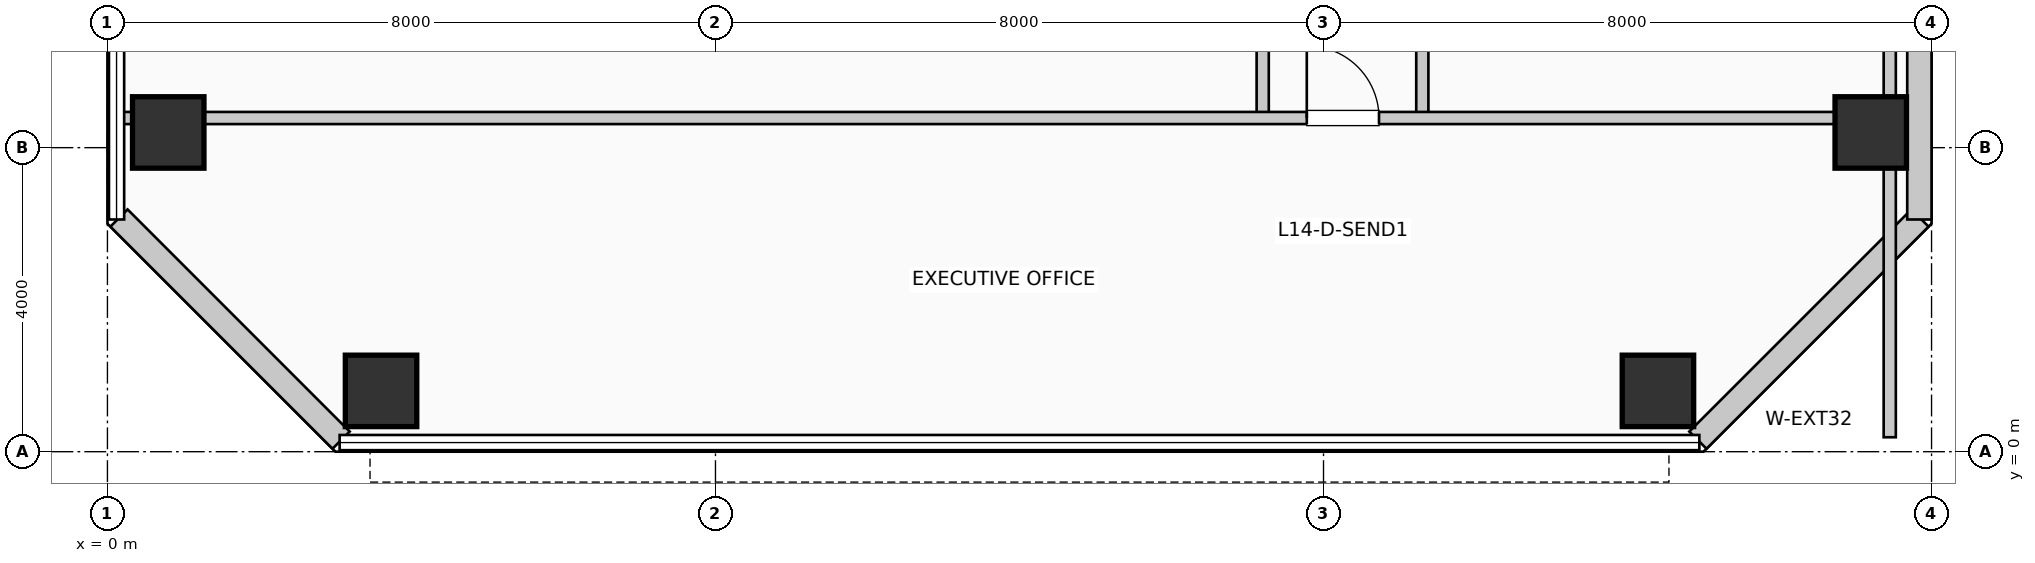
"""IFC4 building model, lengths in metres.
Left out: names, types, materials, properties, quantities, classifications, styles, units other than length and angle.
Written with IfcOpenShell. Run it as: python <this file> out.ifc"""

import sys

from ifc_helpers import new_model, si_unit, direction, frame, frame_2d, origin, origin_2d, place, context, subcontext, project, spatial, rectangle, extrude, element, fill, save


model = new_model("IFC4")
c1 = context("Model", 3, precision=1e-05, world=origin(), true_north=direction((0.0, 1.0)))
c2 = subcontext(c1, "Body", "Model", "MODEL_VIEW")
j1 = project(units=[si_unit("LENGTHUNIT", "METRE"), si_unit("PLANEANGLEUNIT", "RADIAN")], contexts=[c1])
p1 = place(None, origin())
s1 = spatial("IfcSite", under=j1, at=p1, CompositionType="ELEMENT")
p2 = place(p1, origin())
s2 = spatial("IfcBuilding", under=s1, at=p2, CompositionType="ELEMENT")
p3 = place(p2, frame((0.0, 0.0, 62.04)))
s3 = spatial("IfcBuildingStorey", under=s2, at=p3, CompositionType="ELEMENT", Elevation=62.04)
for number, where, z_axis, x_axis in (
    (1, (0.8, 4.2, 0.0), (0.0, 0.0, 1.0), (1.0, 0.0, 0.0)),
    (2, (3.6, 0.8, 0.0), (0.0, 0.0, 1.0), (1.0, 0.0, 0.0)),
    (3, (20.4, 0.8, 0.0), (0.0, 0.0, 1.0), (1.0, 0.0, 0.0)),
    (4, (23.2, 4.2, 0.0), (0.0, 0.0, 1.0), (1.0, 0.0, 0.0)),
):
    element("IfcColumn", number, at=place(p3, frame(where, z_axis=z_axis, x_axis=x_axis)), inside=s3, PredefinedType="COLUMN", context=c2, shape_type="SweptSolid", body=[
        extrude(rectangle(XDim=0.94, YDim=0.94, at=origin_2d()), origin(), (0.0, 0.0, 1.0), 3.96),
    ])
p4 = place(p3, frame((20.926, 0.152, 0.0), z_axis=(0.0, 0.0, 1.0), x_axis=(0.707106781187, 0.707106781187, 0.0)))
e5 = element("IfcWall", 5, at=p4, inside=s3, PredefinedType="SOLIDWALL", context=c2, shape_type="SweptSolid", body=[
    extrude(rectangle(XDim=4.133, YDim=0.32, at=frame_2d((2.066, 0.0))), origin(), (0.0, 0.0, 1.0), 3.71),
])
p5 = place(p3, frame((23.84, 3.055, 0.0), z_axis=(0.0, 0.0, 1.0), x_axis=(0.0, 1.0, 0.0)))
e6 = element("IfcWall", 6, at=p5, inside=s3, PredefinedType="SOLIDWALL", context=c2, shape_type="SweptSolid", body=[
    extrude(rectangle(XDim=12.89, YDim=0.32, at=frame_2d((6.445, 0.0))), origin(), (0.0, 0.0, 1.0), 3.71),
])
p6 = place(p3, frame((0.152, 3.074, 0.0), z_axis=(0.0, 0.0, 1.0), x_axis=(0.707106781187, -0.707106781187, 0.0)))
e7 = element("IfcWall", 7, at=p6, inside=s3, PredefinedType="SOLIDWALL", context=c2, shape_type="SweptSolid", body=[
    extrude(rectangle(XDim=4.133, YDim=0.32, at=frame_2d((2.066, 0.0))), origin(), (0.0, 0.0, 1.0), 3.71),
])
p7 = place(p3, frame((15.2, 4.39, 0.0), z_axis=(0.0, 0.0, 1.0), x_axis=(0.0, 1.0, 0.0)))
e8 = element("IfcWall", 8, at=p7, inside=s3, PredefinedType="PARTITIONING", context=c2, shape_type="SweptSolid", body=[
    extrude(rectangle(XDim=25.01, YDim=0.16, at=frame_2d((12.505, 0.0))), origin(), (0.0, 0.0, 1.0), 3.71),
])
p8 = place(p7, frame((2.851, 0.0, 0.0), z_axis=(0.0, 0.0, 1.0), x_axis=(-1.0, 0.0, 0.0)))
e9 = element("IfcOpeningElement", 9, at=p8, cuts=e8, PredefinedType="OPENING", context=c2, shape_type="SweptSolid", body=[
    extrude(rectangle(XDim=0.95, YDim=2.15, at=frame_2d((0.475, 1.075))), frame((0.0, 0.09, 0.0), z_axis=(0.0, -1.0, 0.0), x_axis=(1.0, 0.0, 0.0)), (0.0, 0.0, 1.0), 0.18),
])
p9 = place(p7, frame((7.728, 0.0, 0.0), z_axis=(0.0, 0.0, 1.0), x_axis=(-1.0, 0.0, 0.0)))
e10 = element("IfcOpeningElement", 10, at=p9, cuts=e8, PredefinedType="OPENING", context=c2, shape_type="SweptSolid", body=[
    extrude(rectangle(XDim=0.95, YDim=2.15, at=frame_2d((0.475, 1.075))), frame((0.0, 0.09, 0.0), z_axis=(0.0, -1.0, 0.0), x_axis=(1.0, 0.0, 0.0)), (0.0, 0.0, 1.0), 0.18),
])
p10 = place(p7, frame((12.73, 0.0, 0.0), z_axis=(0.0, 0.0, 1.0), x_axis=(-1.0, 0.0, 0.0)))
e11 = element("IfcOpeningElement", 11, at=p10, cuts=e8, PredefinedType="OPENING", context=c2, shape_type="SweptSolid", body=[
    extrude(rectangle(XDim=0.95, YDim=2.15, at=frame_2d((0.475, 1.075))), frame((0.0, 0.09, 0.0), z_axis=(0.0, -1.0, 0.0), x_axis=(1.0, 0.0, 0.0)), (0.0, 0.0, 1.0), 0.18),
])
p11 = place(p7, frame((17.732, 0.0, 0.0), z_axis=(0.0, 0.0, 1.0), x_axis=(-1.0, 0.0, 0.0)))
e12 = element("IfcOpeningElement", 12, at=p11, cuts=e8, PredefinedType="OPENING", context=c2, shape_type="SweptSolid", body=[
    extrude(rectangle(XDim=0.95, YDim=2.15, at=frame_2d((0.475, 1.075))), frame((0.0, 0.09, 0.0), z_axis=(0.0, -1.0, 0.0), x_axis=(1.0, 0.0, 0.0)), (0.0, 0.0, 1.0), 0.18),
])
p12 = place(p7, frame((22.859, 0.0, 0.0), z_axis=(0.0, 0.0, 1.0), x_axis=(-1.0, 0.0, 0.0)))
e13 = element("IfcOpeningElement", 13, at=p12, cuts=e8, PredefinedType="OPENING", context=c2, shape_type="SweptSolid", body=[
    extrude(rectangle(XDim=0.95, YDim=2.15, at=frame_2d((0.475, 1.075))), frame((0.0, 0.09, 0.0), z_axis=(0.0, -1.0, 0.0), x_axis=(1.0, 0.0, 0.0)), (0.0, 0.0, 1.0), 0.18),
])
p13 = place(p3, frame((17.3, 4.39, 0.0), z_axis=(0.0, 0.0, 1.0), x_axis=(0.0, 1.0, 0.0)))
e14 = element("IfcWall", 14, at=p13, inside=s3, PredefinedType="PARTITIONING", context=c2, shape_type="SweptSolid", body=[
    extrude(rectangle(XDim=25.01, YDim=0.16, at=frame_2d((12.505, 0.0))), origin(), (0.0, 0.0, 1.0), 3.71),
])
p14 = place(p13, frame((5.778, 0.0, 0.0)))
e15 = element("IfcOpeningElement", 15, at=p14, cuts=e14, PredefinedType="OPENING", context=c2, shape_type="SweptSolid", body=[
    extrude(rectangle(XDim=0.95, YDim=2.15, at=frame_2d((0.475, 1.075))), frame((0.0, 0.09, 0.0), z_axis=(0.0, -1.0, 0.0), x_axis=(1.0, 0.0, 0.0)), (0.0, 0.0, 1.0), 0.18),
])
p15 = place(p13, frame((18.282, 0.0, 0.0)))
e16 = element("IfcOpeningElement", 16, at=p15, cuts=e14, PredefinedType="OPENING", context=c2, shape_type="SweptSolid", body=[
    extrude(rectangle(XDim=0.95, YDim=2.15, at=frame_2d((0.475, 1.075))), frame((0.0, 0.09, 0.0), z_axis=(0.0, -1.0, 0.0), x_axis=(1.0, 0.0, 0.0)), (0.0, 0.0, 1.0), 0.18),
])
p16 = place(p3, frame((0.19, 4.39, 0.0), z_axis=(0.0, 0.0, 1.0), x_axis=(1.0, 0.0, 0.0)))
e17 = element("IfcWall", 17, at=p16, inside=s3, PredefinedType="PARTITIONING", context=c2, shape_type="SweptSolid", body=[
    extrude(rectangle(XDim=23.26, YDim=0.16, at=frame_2d((11.63, 0.0))), origin(), (0.0, 0.0, 1.0), 2.995),
])
p17 = place(p16, frame((15.59, 0.0, 0.0)))
e18 = element("IfcOpeningElement", 18, at=p17, cuts=e17, PredefinedType="OPENING", context=c2, shape_type="SweptSolid", body=[
    extrude(rectangle(XDim=0.95, YDim=2.15, at=frame_2d((0.475, 1.075))), frame((0.0, 0.09, 0.0), z_axis=(0.0, -1.0, 0.0), x_axis=(1.0, 0.0, 0.0)), (0.0, 0.0, 1.0), 0.18),
])
p18 = place(p3, frame((23.45, 0.19, 0.0), z_axis=(0.0, 0.0, 1.0), x_axis=(0.0, 1.0, 0.0)))
e19 = element("IfcWall", 19, at=p18, inside=s3, PredefinedType="PARTITIONING", context=c2, shape_type="SweptSolid", body=[
    extrude(rectangle(XDim=29.21, YDim=0.16, at=frame_2d((14.605, 0.0))), origin(), (0.0, 0.0, 1.0), 2.995),
])
p19 = place(p17, origin())
e20 = element("IfcDoor", 20, at=p19, inside=s3, OperationType="SINGLE_SWING_LEFT", PredefinedType="DOOR", context=c2, shape_type="SweptSolid", body=[
    extrude(rectangle(XDim=0.95, YDim=2.15, at=frame_2d((0.475, 1.075))), frame((0.0, 0.025, 0.0), z_axis=(0.0, -1.0, 0.0), x_axis=(1.0, 0.0, 0.0)), (0.0, 0.0, 1.0), 0.05),
])
fill(e18, e20)
save(model, sys.argv[1])
